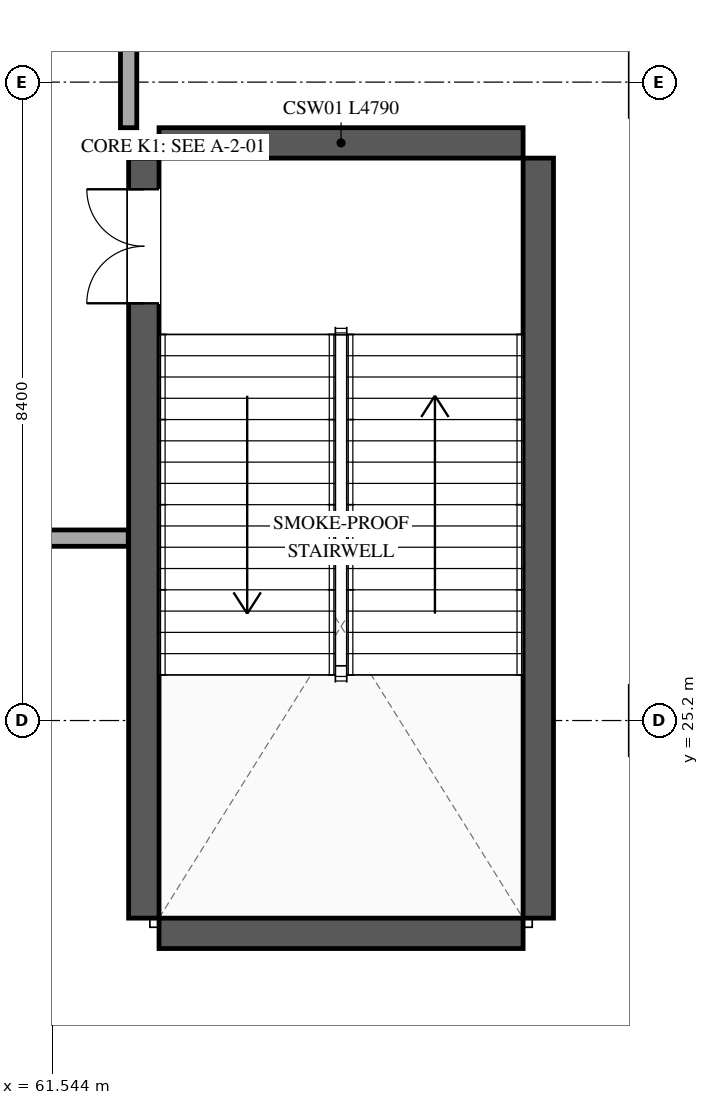
"""IFC4 building model, lengths in metres.
Left out: names, types, materials, properties, quantities, classifications, styles, units other than length and angle.
Written with IfcOpenShell. Run it as: python <this file> out.ifc"""

import sys

from ifc_helpers import new_model, si_unit, direction, frame, frame_2d, origin, place, context, subcontext, project, spatial, rectangle, extrude, element, fill, save


model = new_model("IFC4")
c1 = context("Model", 3, precision=1e-05, world=origin(), true_north=direction((0.0, 1.0)))
c2 = subcontext(c1, "Body", "Model", "MODEL_VIEW")
j1 = project(units=[si_unit("LENGTHUNIT", "METRE"), si_unit("PLANEANGLEUNIT", "RADIAN")], contexts=[c1])
p1 = place(None, origin())
s1 = spatial("IfcSite", under=j1, at=p1, CompositionType="ELEMENT")
p2 = place(p1, origin())
s2 = spatial("IfcBuilding", under=s1, at=p2, CompositionType="ELEMENT")
p3 = place(p2, frame((0.0, 0.0, 11.4)))
s3 = spatial("IfcBuildingStorey", under=s2, at=p3, CompositionType="ELEMENT", Elevation=11.4)
p4 = place(p3, frame((62.75, 22.6, 0.0), z_axis=(0.0, 0.0, 1.0), x_axis=(0.0, 1.0, 0.0)))
e1 = element("IfcWall", 1, at=p4, inside=s3, PredefinedType="SHEAR", context=c2, shape_type="SweptSolid", body=[
    extrude(rectangle(XDim=10.0, YDim=0.4, at=frame_2d((5.0, 0.0))), origin(), (0.0, 0.0, 1.0), 5.1),
])
p5 = place(p4, frame((8.09, 0.0, 0.0)))
e2 = element("IfcOpeningElement", 2, at=p5, cuts=e1, PredefinedType="OPENING", context=c2, shape_type="SweptSolid", body=[
    extrude(rectangle(XDim=1.5, YDim=2.2, at=frame_2d((0.75, 1.1))), frame((0.0, 0.21, 0.0), z_axis=(0.0, -1.0, 0.0), x_axis=(1.0, 0.0, 0.0)), (0.0, 0.0, 1.0), 0.42),
])
p6 = place(p3, frame((67.94, 32.6, 0.0), z_axis=(0.0, 0.0, 1.0), x_axis=(0.0, -1.0, 0.0)))
e3 = element("IfcWall", 3, at=p6, inside=s3, PredefinedType="SHEAR", context=c2, shape_type="SweptSolid", body=[
    extrude(rectangle(XDim=10.0, YDim=0.4, at=frame_2d((5.0, 0.0))), origin(), (0.0, 0.0, 1.0), 5.1),
])
for number, where, z_axis, x_axis in (
    (4, (67.74, 22.4, 0.0), (0.0, 0.0, 1.0), (-1.0, 0.0, 0.0)),
    (5, (62.95, 32.8, 0.0), (0.0, 0.0, 1.0), (1.0, 0.0, 0.0)),
):
    element("IfcWall", number, at=place(p3, frame(where, z_axis=z_axis, x_axis=x_axis)), inside=s3, PredefinedType="SHEAR", context=c2, shape_type="SweptSolid", body=[
        extrude(rectangle(XDim=4.79, YDim=0.4, at=frame_2d((2.395, 0.0))), origin(), (0.0, 0.0, 1.0), 5.1),
    ])
p7 = place(p3, frame((62.545, 27.6, 0.0), z_axis=(0.0, 0.0, 1.0), x_axis=(-1.0, 0.0, 0.0)))
e6 = element("IfcWall", 6, at=p7, inside=s3, PredefinedType="PARTITIONING", context=c2, shape_type="SweptSolid", body=[
    extrude(rectangle(XDim=5.745, YDim=0.215, at=frame_2d((2.873, 0.0))), origin(), (0.0, 0.0, 1.0), 4.06),
])
p8 = place(p7, frame((2.198, 0.0, 0.0)))
e7 = element("IfcOpeningElement", 7, at=p8, cuts=e6, PredefinedType="OPENING", context=c2, shape_type="SweptSolid", body=[
    extrude(rectangle(XDim=1.35, YDim=2.2, at=frame_2d((0.675, 1.1))), frame((0.0, 0.118, 0.0), z_axis=(0.0, -1.0, 0.0), x_axis=(1.0, 0.0, 0.0)), (0.0, 0.0, 1.0), 0.235),
])
p9 = place(p3, frame((62.55, 35.0, 0.0), z_axis=(0.0, 0.0, 1.0), x_axis=(0.0, -1.0, 0.0)))
e8 = element("IfcWall", 8, at=p9, inside=s3, PredefinedType="PARTITIONING", context=c2, shape_type="SweptSolid", body=[
    extrude(rectangle(XDim=2.0, YDim=0.215, at=frame_2d((1.0, 0.0))), origin(), (0.0, 0.0, 1.0), 4.06),
])
p10 = place(p5, origin())
e9 = element("IfcDoor", 9, at=p10, inside=s3, OperationType="DOUBLE_DOOR_SINGLE_SWING", PredefinedType="DOOR", context=c2, shape_type="SweptSolid", body=[
    extrude(rectangle(XDim=1.5, YDim=2.2, at=frame_2d((0.75, 1.1))), frame((0.0, 0.025, 0.0), z_axis=(0.0, -1.0, 0.0), x_axis=(1.0, 0.0, 0.0)), (0.0, 0.0, 1.0), 0.05),
])
fill(e2, e9)
save(model, sys.argv[1])
